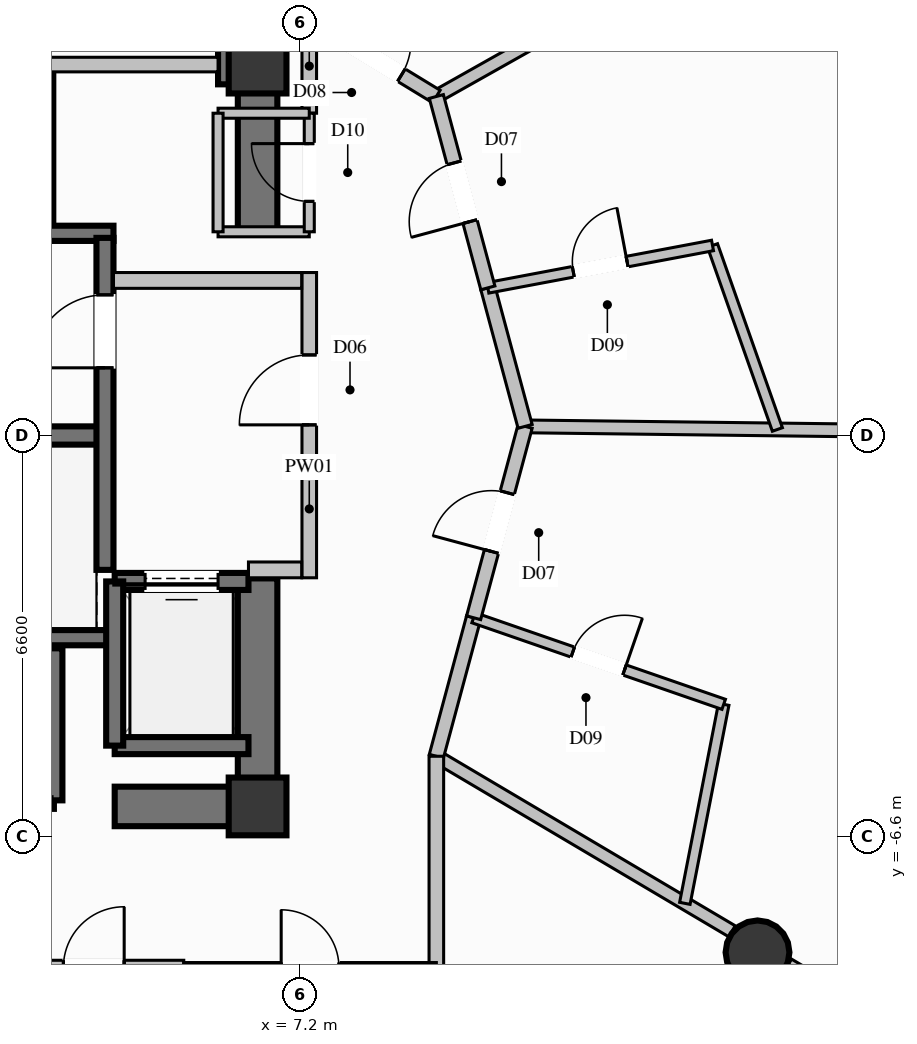
"""IFC4 building model, lengths in metres.
Left out: names, types, materials, properties, quantities, classifications, styles, units other than length and angle.
Written with IfcOpenShell. Run it as: python <this file> out.ifc"""

import sys

from ifc_helpers import new_model, si_unit, direction, frame, frame_2d, origin, origin_2d, place, context, subcontext, project, spatial, rectangle, circle, extrude, element, fill, save


model = new_model("IFC4")
c1 = context("Model", 3, precision=1e-05, world=origin(), true_north=direction((0.0, 1.0)))
c2 = subcontext(c1, "Body", "Model", "MODEL_VIEW")
j1 = project(units=[si_unit("LENGTHUNIT", "METRE"), si_unit("PLANEANGLEUNIT", "RADIAN")], contexts=[c1])
p1 = place(None, origin())
s1 = spatial("IfcSite", under=j1, at=p1, CompositionType="ELEMENT")
p2 = place(p1, origin())
s2 = spatial("IfcBuilding", under=s1, at=p2, CompositionType="ELEMENT")
p3 = place(p2, frame((0.0, 0.0, 135.0)))
s3 = spatial("IfcBuildingStorey", under=s2, at=p3, CompositionType="ELEMENT", Elevation=135.0)
for number, where, z_axis, x_axis in (
    (1, (6.5, -6.1, 0.0), (0.0, 0.0, 1.0), (1.0, 0.0, 0.0)),
    (2, (6.5, 6.1, 0.0), (0.0, 0.0, 1.0), (1.0, 0.0, 0.0)),
):
    element("IfcColumn", number, at=place(p3, frame(where, z_axis=z_axis, x_axis=x_axis)), inside=s3, PredefinedType="COLUMN", context=c2, shape_type="SweptSolid", body=[
        extrude(rectangle(XDim=0.95, YDim=0.95, at=origin_2d()), origin(), (0.0, 0.0, 1.0), 3.6),
    ])
p4 = place(p3, frame((-3.99, 0.0, 0.0), z_axis=(0.0, 0.0, 1.0), x_axis=(1.0, 0.0, 0.0)))
e3 = element("IfcWall", 3, at=p4, inside=s3, PredefinedType="SHEAR", context=c2, shape_type="SweptSolid", body=[
    extrude(rectangle(XDim=7.98, YDim=0.3, at=frame_2d((3.99, 0.0))), origin(), (0.0, 0.0, 1.0), 3.6),
])
for number, where, z_axis, x_axis in (
    (4, (-4.13, -3.325, 0.0), (0.0, 0.0, 1.0), (1.0, 0.0, 0.0)),
    (5, (-4.13, 3.325, 0.0), (0.0, 0.0, 1.0), (1.0, 0.0, 0.0)),
):
    element("IfcWall", number, at=place(p3, frame(where, z_axis=z_axis, x_axis=x_axis)), inside=s3, PredefinedType="SOLIDWALL", context=c2, shape_type="SweptSolid", body=[
        extrude(rectangle(XDim=8.26, YDim=0.25, at=frame_2d((4.13, 0.0))), origin(), (0.0, 0.0, 1.0), 3.6),
    ])
p5 = place(p3, frame((4.15, -6.1, 0.0), z_axis=(0.0, 0.0, 1.0), x_axis=(1.0, 0.0, 0.0)))
e6 = element("IfcWall", 6, at=p5, inside=s3, PredefinedType="SHEAR", context=c2, shape_type="SweptSolid", body=[
    extrude(rectangle(XDim=2.025, YDim=0.65, at=frame_2d((1.013, 0.0))), origin(), (0.0, 0.0, 1.0), 3.6),
])
p6 = place(p3, frame((5.85, 6.1, 0.0), z_axis=(0.0, 0.0, 1.0), x_axis=(1.0, 0.0, 0.0)))
e7 = element("IfcWall", 7, at=p6, inside=s3, PredefinedType="SHEAR", context=c2, shape_type="SweptSolid", body=[
    extrude(rectangle(XDim=0.325, YDim=0.65, at=frame_2d((0.163, 0.0))), origin(), (0.0, 0.0, 1.0), 3.6),
])
p7 = place(p3, frame((6.5, -6.425, 0.0), z_axis=(0.0, 0.0, 1.0), x_axis=(0.0, 1.0, 0.0)))
e8 = element("IfcWall", 8, at=p7, inside=s3, PredefinedType="SHEAR", context=c2, shape_type="SweptSolid", body=[
    extrude(rectangle(XDim=4.075, YDim=0.65, at=frame_2d((2.038, 0.0))), origin(), (0.0, 0.0, 1.0), 3.6),
])
p8 = place(p3, frame((6.5, 3.35, 0.0), z_axis=(0.0, 0.0, 1.0), x_axis=(0.0, 1.0, 0.0)))
e9 = element("IfcWall", 9, at=p8, inside=s3, PredefinedType="SHEAR", context=c2, shape_type="SweptSolid", body=[
    extrude(rectangle(XDim=3.075, YDim=0.65, at=frame_2d((1.538, 0.0))), origin(), (0.0, 0.0, 1.0), 3.6),
])
p9 = place(p3, frame((14.722, -8.5, 0.0), z_axis=(0.0, 0.0, 1.0), x_axis=(1.0, 0.0, 0.0)))
e10 = element("IfcColumn", 10, at=p9, inside=s3, PredefinedType="COLUMN", context=c2, shape_type="SweptSolid", body=[
    extrude(circle(Radius=0.525, at=origin_2d()), origin(), (0.0, 0.0, 1.0), 3.6),
])
p10 = place(p3, frame((1.05, -6.0, 0.0), z_axis=(0.0, 0.0, 1.0), x_axis=(1.0, 0.0, 0.0)))
e11 = element("IfcWall", 11, at=p10, inside=s3, PredefinedType="SOLIDWALL", context=c2, shape_type="SweptSolid", body=[
    extrude(rectangle(XDim=2.1, YDim=0.28, at=frame_2d((1.05, 0.0))), origin(), (0.0, 0.0, 1.0), 3.35),
])
p11 = place(p10, frame((0.5, 0.0, 0.0)))
e12 = element("IfcOpeningElement", 12, at=p11, cuts=e11, PredefinedType="OPENING", context=c2, shape_type="SweptSolid", body=[
    extrude(rectangle(XDim=1.1, YDim=2.2, at=frame_2d((0.55, 1.1))), frame((0.0, 0.15, 0.0), z_axis=(0.0, -1.0, 0.0), x_axis=(1.0, 0.0, 0.0)), (0.0, 0.0, 1.0), 0.3),
])
for number, where, z_axis, x_axis in (
    (13, (3.15, -6.0, 0.0), (0.0, 0.0, 1.0), (0.0, 1.0, 0.0)),
    (14, (3.0, 3.5, 0.0), (0.0, 0.0, 1.0), (0.0, 1.0, 0.0)),
):
    element("IfcWall", number, at=place(p3, frame(where, z_axis=z_axis, x_axis=x_axis)), inside=s3, PredefinedType="SOLIDWALL", context=c2, shape_type="SweptSolid", body=[
        extrude(rectangle(XDim=2.5, YDim=0.28, at=frame_2d((1.25, 0.0))), origin(), (0.0, 0.0, 1.0), 3.35),
    ])
p12 = place(p3, frame((4.15, -5.1, 0.0), z_axis=(0.0, 0.0, 1.0), x_axis=(1.0, 0.0, 0.0)))
e15 = element("IfcWall", 15, at=p12, inside=s3, PredefinedType="SOLIDWALL", context=c2, shape_type="SweptSolid", body=[
    extrude(rectangle(XDim=2.2, YDim=0.28, at=frame_2d((1.1, 0.0))), origin(), (0.0, 0.0, 1.0), 3.35),
])
p13 = place(p3, frame((6.35, -2.4, 0.0), z_axis=(0.0, 0.0, 1.0), x_axis=(-1.0, 0.0, 0.0)))
e16 = element("IfcWall", 16, at=p13, inside=s3, PredefinedType="SOLIDWALL", context=c2, shape_type="SweptSolid", body=[
    extrude(rectangle(XDim=2.2, YDim=0.28, at=frame_2d((1.1, 0.0))), origin(), (0.0, 0.0, 1.0), 3.35),
])
p14 = place(p13, frame((0.5, 0.0, 0.0)))
e17 = element("IfcOpeningElement", 17, at=p14, cuts=e16, PredefinedType="OPENING", context=c2, shape_type="SweptSolid", body=[
    extrude(rectangle(XDim=1.2, YDim=2.2, at=frame_2d((0.6, 1.1))), frame((0.0, 0.15, 0.0), z_axis=(0.0, -1.0, 0.0), x_axis=(1.0, 0.0, 0.0)), (0.0, 0.0, 1.0), 0.3),
])
p15 = place(p3, frame((4.15, -2.4, 0.0), z_axis=(0.0, 0.0, 1.0), x_axis=(0.0, -1.0, 0.0)))
e18 = element("IfcWall", 18, at=p15, inside=s3, PredefinedType="SOLIDWALL", context=c2, shape_type="SweptSolid", body=[
    extrude(rectangle(XDim=2.7, YDim=0.28, at=frame_2d((1.35, 0.0))), origin(), (0.0, 0.0, 1.0), 3.35),
])
p16 = place(p3, frame((3.99, -2.21, 0.0), z_axis=(0.0, 0.0, 1.0), x_axis=(0.0, 1.0, 0.0)))
e19 = element("IfcWall", 19, at=p16, inside=s3, PredefinedType="SOLIDWALL", context=c2, shape_type="SweptSolid", body=[
    extrude(rectangle(XDim=5.46, YDim=0.28, at=frame_2d((2.73, 0.0))), origin(), (0.0, 0.0, 1.0), 3.35),
])
p17 = place(p16, frame((3.323, 0.0, 0.0)))
e20 = element("IfcOpeningElement", 20, at=p17, cuts=e19, PredefinedType="OPENING", context=c2, shape_type="SweptSolid", body=[
    extrude(rectangle(XDim=1.2, YDim=2.2, at=frame_2d((0.6, 1.1))), frame((0.0, 0.15, 0.0), z_axis=(0.0, -1.0, 0.0), x_axis=(1.0, 0.0, 0.0)), (0.0, 0.0, 1.0), 0.3),
])
p18 = place(p3, frame((7.35, -2.34, 0.0), z_axis=(0.0, 0.0, 1.0), x_axis=(0.0, 1.0, 0.0)))
e21 = element("IfcWall", 21, at=p18, inside=s3, PredefinedType="PARTITIONING", context=c2, shape_type="SweptSolid", body=[
    extrude(rectangle(XDim=5.02, YDim=0.24, at=frame_2d((2.51, 0.0))), origin(), (0.0, 0.0, 1.0), 2.435),
])
p19 = place(p18, frame((2.515, 0.0, 0.0)))
e22 = element("IfcOpeningElement", 22, at=p19, cuts=e21, PredefinedType="OPENING", context=c2, shape_type="SweptSolid", body=[
    extrude(rectangle(XDim=1.15, YDim=2.2, at=frame_2d((0.575, 1.1))), frame((0.0, 0.13, 0.0), z_axis=(0.0, -1.0, 0.0), x_axis=(1.0, 0.0, 0.0)), (0.0, 0.0, 1.0), 0.26),
])
p20 = place(p3, frame((6.35, -2.21, 0.0), z_axis=(0.0, 0.0, 1.0), x_axis=(1.0, 0.0, 0.0)))
e23 = element("IfcWall", 23, at=p20, inside=s3, PredefinedType="PARTITIONING", context=c2, shape_type="SweptSolid", body=[
    extrude(rectangle(XDim=0.875, YDim=0.26, at=frame_2d((0.438, 0.0))), origin(), (0.0, 0.0, 1.0), 3.35),
])
p21 = place(p3, frame((4.13, 2.55, 0.0), z_axis=(0.0, 0.0, 1.0), x_axis=(1.0, 0.0, 0.0)))
e24 = element("IfcWall", 24, at=p21, inside=s3, PredefinedType="PARTITIONING", context=c2, shape_type="SweptSolid", body=[
    extrude(rectangle(XDim=3.095, YDim=0.26, at=frame_2d((1.548, 0.0))), origin(), (0.0, 0.0, 1.0), 3.35),
])
p22 = place(p3, frame((7.35, 5.3, 0.0), z_axis=(0.0, 0.0, 1.0), x_axis=(0.0, 1.0, 0.0)))
e25 = element("IfcWall", 25, at=p22, inside=s3, PredefinedType="PARTITIONING", context=c2, shape_type="SweptSolid", body=[
    extrude(rectangle(XDim=1.55, YDim=0.24, at=frame_2d((0.775, 0.0))), origin(), (0.0, 0.0, 1.0), 2.435),
])
p23 = place(p3, frame((3.0, 6.1, 0.0), z_axis=(0.0, 0.0, 1.0), x_axis=(1.0, 0.0, 0.0)))
e26 = element("IfcWall", 26, at=p23, inside=s3, PredefinedType="PARTITIONING", context=c2, shape_type="SweptSolid", body=[
    extrude(rectangle(XDim=2.85, YDim=0.24, at=frame_2d((1.425, 0.0))), origin(), (0.0, 0.0, 1.0), 2.435),
])
p24 = place(p3, frame((5.85, 3.35, 0.0), z_axis=(0.0, 0.0, 1.0), x_axis=(1.0, 0.0, 0.0)))
e27 = element("IfcWall", 27, at=p24, inside=s3, PredefinedType="PARTITIONING", context=c2, shape_type="SweptSolid", body=[
    extrude(rectangle(XDim=1.5, YDim=0.165, at=frame_2d((0.75, 0.0))), origin(), (0.0, 0.0, 1.0), 3.35),
])
p25 = place(p3, frame((7.35, 3.35, 0.0), z_axis=(0.0, 0.0, 1.0), x_axis=(0.0, 1.0, 0.0)))
e28 = element("IfcWall", 28, at=p25, inside=s3, PredefinedType="PARTITIONING", context=c2, shape_type="SweptSolid", body=[
    extrude(rectangle(XDim=1.95, YDim=0.165, at=frame_2d((0.975, 0.0))), origin(), (0.0, 0.0, 1.0), 3.35),
])
p26 = place(p25, frame((0.5, 0.0, 0.0)))
e29 = element("IfcOpeningElement", 29, at=p26, cuts=e28, PredefinedType="OPENING", context=c2, shape_type="SweptSolid", body=[
    extrude(rectangle(XDim=0.95, YDim=2.1, at=frame_2d((0.475, 1.05))), frame((0.0, 0.093, 0.0), z_axis=(0.0, -1.0, 0.0), x_axis=(1.0, 0.0, 0.0)), (0.0, 0.0, 1.0), 0.185),
])
p27 = place(p3, frame((7.35, 5.3, 0.0), z_axis=(0.0, 0.0, 1.0), x_axis=(-1.0, 0.0, 0.0)))
e30 = element("IfcWall", 30, at=p27, inside=s3, PredefinedType="PARTITIONING", context=c2, shape_type="SweptSolid", body=[
    extrude(rectangle(XDim=1.5, YDim=0.165, at=frame_2d((0.75, 0.0))), origin(), (0.0, 0.0, 1.0), 2.435),
])
p28 = place(p3, frame((5.85, 5.3, 0.0), z_axis=(0.0, 0.0, 1.0), x_axis=(0.0, -1.0, 0.0)))
e31 = element("IfcWall", 31, at=p28, inside=s3, PredefinedType="PARTITIONING", context=c2, shape_type="SweptSolid", body=[
    extrude(rectangle(XDim=1.95, YDim=0.165, at=frame_2d((0.975, 0.0))), origin(), (0.0, 0.0, 1.0), 2.435),
])
p29 = place(p3, frame((10.9, 0.15, 0.0), z_axis=(0.0, 0.0, 1.0), x_axis=(0.999925530249, -0.012203850093, 0.0)))
e32 = element("IfcWall", 32, at=p29, inside=s3, PredefinedType="PARTITIONING", context=c2, shape_type="SweptSolid", body=[
    extrude(rectangle(XDim=5.562, YDim=0.21, at=frame_2d((2.781, 0.0))), origin(), (0.0, 0.0, 1.0), 3.35),
])
p30 = place(p3, frame((9.44, 5.575, 0.0), z_axis=(0.0, 0.0, 1.0), x_axis=(0.871243078021, 0.490851809613, 0.0)))
e33 = element("IfcWall", 33, at=p30, inside=s3, PredefinedType="PARTITIONING", context=c2, shape_type="SweptSolid", body=[
    extrude(rectangle(XDim=5.495, YDim=0.21, at=frame_2d((2.747, 0.0))), origin(), (0.0, 0.0, 1.0), 2.717),
])
p31 = place(p3, frame((9.44, -5.275, 0.0), z_axis=(0.0, 0.0, 1.0), x_axis=(0.860527977628, -0.509403179927, 0.0)))
e34 = element("IfcWall", 34, at=p31, inside=s3, PredefinedType="PARTITIONING", context=c2, shape_type="SweptSolid", body=[
    extrude(rectangle(XDim=5.65, YDim=0.21, at=frame_2d((2.825, 0.0))), origin(), (0.0, 0.0, 1.0), 2.717),
])
p32 = place(p3, frame((15.228, -8.701, 0.0), z_axis=(0.0, 0.0, 1.0), x_axis=(0.860535668123, -0.509390188253, 0.0)))
e35 = element("IfcWall", 35, at=p32, inside=s3, PredefinedType="PARTITIONING", context=c2, shape_type="SweptSolid", body=[
    extrude(rectangle(XDim=7.242, YDim=0.21, at=frame_2d((3.621, 0.0))), origin(), (0.0, 0.0, 1.0), 3.35),
])
p33 = place(p3, frame((7.35, 6.85, 0.0), z_axis=(0.0, 0.0, 1.0), x_axis=(0.853641534933, -0.520860950579, 0.0)))
e36 = element("IfcWall", 36, at=p33, inside=s3, PredefinedType="PARTITIONING", context=c2, shape_type="SweptSolid", body=[
    extrude(rectangle(XDim=2.448, YDim=0.24, at=frame_2d((1.224, 0.0))), origin(), (0.0, 0.0, 1.0), 3.35),
])
p34 = place(p33, frame((0.674, 0.0, 0.0)))
e37 = element("IfcOpeningElement", 37, at=p34, cuts=e36, PredefinedType="OPENING", context=c2, shape_type="SweptSolid", body=[
    extrude(rectangle(XDim=1.1, YDim=2.3, at=frame_2d((0.55, 1.15))), frame((0.0, 0.13, 0.0), z_axis=(0.0, -1.0, 0.0), x_axis=(1.0, 0.0, 0.0)), (0.0, 0.0, 1.0), 0.26),
])
p35 = place(p3, frame((9.44, -5.275, 0.0), z_axis=(0.0, 0.0, 1.0), x_axis=(0.25988439237, 0.965639737481, 0.0)))
e38 = element("IfcWall", 38, at=p35, inside=s3, PredefinedType="PARTITIONING", context=c2, shape_type="SweptSolid", body=[
    extrude(rectangle(XDim=2.359, YDim=0.24, at=frame_2d((1.179, 0.0))), origin(), (0.0, 0.0, 1.0), 3.35),
])
p36 = place(p3, frame((13.527, -7.694, 0.0), z_axis=(0.0, 0.0, 1.0), x_axis=(0.191580880293, 0.981476829225, 0.0)))
e39 = element("IfcWall", 39, at=p36, inside=s3, PredefinedType="PLUMBINGWALL", context=c2, shape_type="SweptSolid", body=[
    extrude(rectangle(XDim=3.335, YDim=0.175, at=frame_2d((1.667, 0.0))), origin(), (0.0, 0.0, 1.0), 3.35),
])
p37 = place(p3, frame((10.053, -2.997, 0.0), z_axis=(0.0, 0.0, 1.0), x_axis=(0.944980071375, -0.327127902669, 0.0)))
e40 = element("IfcWall", 40, at=p37, inside=s3, PredefinedType="PLUMBINGWALL", context=c2, shape_type="SweptSolid", body=[
    extrude(rectangle(XDim=4.353, YDim=0.175, at=frame_2d((2.176, 0.0))), origin(), (0.0, 0.0, 1.0), 3.35),
])
p38 = place(p37, frame((1.726, 0.0, 0.0)))
e41 = element("IfcOpeningElement", 41, at=p38, cuts=e40, PredefinedType="OPENING", context=c2, shape_type="SweptSolid", body=[
    extrude(rectangle(XDim=0.9, YDim=2.1, at=frame_2d((0.45, 1.05))), frame((0.0, 0.098, 0.0), z_axis=(0.0, -1.0, 0.0), x_axis=(1.0, 0.0, 0.0)), (0.0, 0.0, 1.0), 0.195),
])
p39 = place(p3, frame((10.053, -2.997, 0.0), z_axis=(0.0, 0.0, 1.0), x_axis=(0.259876755553, 0.965641792759, 0.0)))
e42 = element("IfcWall", 42, at=p39, inside=s3, PredefinedType="PARTITIONING", context=c2, shape_type="SweptSolid", body=[
    extrude(rectangle(XDim=3.259, YDim=0.24, at=frame_2d((1.629, 0.0))), origin(), (0.0, 0.0, 1.0), 3.35),
])
p40 = place(p39, frame((1.129, 0.0, 0.0)))
e43 = element("IfcOpeningElement", 43, at=p40, cuts=e42, PredefinedType="OPENING", context=c2, shape_type="SweptSolid", body=[
    extrude(rectangle(XDim=1.0, YDim=2.2, at=frame_2d((0.5, 1.1))), frame((0.0, 0.13, 0.0), z_axis=(0.0, -1.0, 0.0), x_axis=(1.0, 0.0, 0.0)), (0.0, 0.0, 1.0), 0.26),
])
p41 = place(p3, frame((10.9, 0.15, 0.0), z_axis=(0.0, 0.0, 1.0), x_axis=(-0.259761917731, 0.965672690976, 0.0)))
e44 = element("IfcWall", 44, at=p41, inside=s3, PredefinedType="PARTITIONING", context=c2, shape_type="SweptSolid", body=[
    extrude(rectangle(XDim=2.359, YDim=0.24, at=frame_2d((1.18, 0.0))), origin(), (0.0, 0.0, 1.0), 3.35),
])
p42 = place(p3, frame((15.049, 0.099, 0.0), z_axis=(0.0, 0.0, 1.0), x_axis=(-0.332593240215, 0.943070377312, 0.0)))
e45 = element("IfcWall", 45, at=p42, inside=s3, PredefinedType="PLUMBINGWALL", context=c2, shape_type="SweptSolid", body=[
    extrude(rectangle(XDim=3.208, YDim=0.175, at=frame_2d((1.604, 0.0))), origin(), (0.0, 0.0, 1.0), 3.35),
])
p43 = place(p3, frame((10.287, 2.428, 0.0), z_axis=(0.0, 0.0, 1.0), x_axis=(0.982667233494, 0.185378284104, 0.0)))
e46 = element("IfcWall", 46, at=p43, inside=s3, PredefinedType="PLUMBINGWALL", context=c2, shape_type="SweptSolid", body=[
    extrude(rectangle(XDim=3.76, YDim=0.175, at=frame_2d((1.88, 0.0))), origin(), (0.0, 0.0, 1.0), 3.35),
])
p44 = place(p43, frame((1.43, 0.0, 0.0)))
e47 = element("IfcOpeningElement", 47, at=p44, cuts=e46, PredefinedType="OPENING", context=c2, shape_type="SweptSolid", body=[
    extrude(rectangle(XDim=0.9, YDim=2.1, at=frame_2d((0.45, 1.05))), frame((0.0, 0.098, 0.0), z_axis=(0.0, -1.0, 0.0), x_axis=(1.0, 0.0, 0.0)), (0.0, 0.0, 1.0), 0.195),
])
p45 = place(p3, frame((10.287, 2.428, 0.0), z_axis=(0.0, 0.0, 1.0), x_axis=(-0.259946608151, 0.965622991084, 0.0)))
e48 = element("IfcWall", 48, at=p45, inside=s3, PredefinedType="PARTITIONING", context=c2, shape_type="SweptSolid", body=[
    extrude(rectangle(XDim=3.259, YDim=0.24, at=frame_2d((1.629, 0.0))), origin(), (0.0, 0.0, 1.0), 3.35),
])
p46 = place(p45, frame((1.129, 0.0, 0.0)))
e49 = element("IfcOpeningElement", 49, at=p46, cuts=e48, PredefinedType="OPENING", context=c2, shape_type="SweptSolid", body=[
    extrude(rectangle(XDim=1.0, YDim=2.2, at=frame_2d((0.5, 1.1))), frame((0.0, 0.13, 0.0), z_axis=(0.0, -1.0, 0.0), x_axis=(1.0, 0.0, 0.0)), (0.0, 0.0, 1.0), 0.26),
])
p47 = place(p3, frame((5.286, -8.75, 0.0), z_axis=(0.0, 0.0, 1.0), x_axis=(0.635601055051, -0.772017680379, 0.0)))
e50 = element("IfcWall", 50, at=p47, inside=s3, PredefinedType="PARTITIONING", context=c2, shape_type="SweptSolid", body=[
    extrude(rectangle(XDim=14.344, YDim=0.21, at=frame_2d((7.172, 0.0))), origin(), (0.0, 0.0, 1.0), 3.35),
])
p48 = place(p3, frame((2.326, -8.75, 0.0), z_axis=(0.0, 0.0, 1.0), x_axis=(1.0, 0.0, 0.0)))
e51 = element("IfcWall", 51, at=p48, inside=s3, PredefinedType="PARTITIONING", context=c2, shape_type="SweptSolid", body=[
    extrude(rectangle(XDim=2.96, YDim=0.24, at=frame_2d((1.48, 0.0))), origin(), (0.0, 0.0, 1.0), 3.35),
])
p49 = place(p48, frame((0.98, 0.0, 0.0)))
e52 = element("IfcOpeningElement", 52, at=p49, cuts=e51, PredefinedType="OPENING", context=c2, shape_type="SweptSolid", body=[
    extrude(rectangle(XDim=1.0, YDim=2.2, at=frame_2d((0.5, 1.1))), frame((0.0, 0.13, 0.0), z_axis=(0.0, -1.0, 0.0), x_axis=(1.0, 0.0, 0.0)), (0.0, 0.0, 1.0), 0.26),
])
p50 = place(p3, frame((9.44, -8.75, 0.0), z_axis=(0.0, 0.0, 1.0), x_axis=(0.0, 1.0, 0.0)))
e53 = element("IfcWall", 53, at=p50, inside=s3, PredefinedType="PARTITIONING", context=c2, shape_type="SweptSolid", body=[
    extrude(rectangle(XDim=3.475, YDim=0.24, at=frame_2d((1.738, 0.0))), origin(), (0.0, 0.0, 1.0), 3.35),
])
p51 = place(p3, frame((5.286, -8.75, 0.0), z_axis=(0.0, 0.0, 1.0), x_axis=(1.0, 0.0, 0.0)))
e54 = element("IfcWall", 54, at=p51, inside=s3, PredefinedType="PARTITIONING", context=c2, shape_type="SweptSolid", body=[
    extrude(rectangle(XDim=4.154, YDim=0.165, at=frame_2d((2.077, 0.0))), origin(), (0.0, 0.0, 1.0), 3.35),
])
p52 = place(p51, frame((1.602, 0.0, 0.0)))
e55 = element("IfcOpeningElement", 55, at=p52, cuts=e54, PredefinedType="OPENING", context=c2, shape_type="SweptSolid", body=[
    extrude(rectangle(XDim=0.95, YDim=2.1, at=frame_2d((0.475, 1.05))), frame((0.0, 0.093, 0.0), z_axis=(0.0, -1.0, 0.0), x_axis=(1.0, 0.0, 0.0)), (0.0, 0.0, 1.0), 0.185),
])
p53 = place(p14, origin())
e56 = element("IfcDoor", 56, at=p53, inside=s3, OperationType="SLIDING_TO_LEFT", PredefinedType="DOOR", context=c2, shape_type="SweptSolid", body=[
    extrude(rectangle(XDim=1.2, YDim=2.2, at=frame_2d((0.6, 1.1))), frame((0.0, 0.025, 0.0), z_axis=(0.0, -1.0, 0.0), x_axis=(1.0, 0.0, 0.0)), (0.0, 0.0, 1.0), 0.05),
])
fill(e17, e56)
p54 = place(p17, origin())
e57 = element("IfcDoor", 57, at=p54, inside=s3, OperationType="SINGLE_SWING_LEFT", PredefinedType="DOOR", context=c2, shape_type="SweptSolid", body=[
    extrude(rectangle(XDim=1.2, YDim=2.2, at=frame_2d((0.6, 1.1))), frame((0.0, 0.025, 0.0), z_axis=(0.0, -1.0, 0.0), x_axis=(1.0, 0.0, 0.0)), (0.0, 0.0, 1.0), 0.05),
])
fill(e20, e57)
p55 = place(p19, origin())
e58 = element("IfcDoor", 58, at=p55, inside=s3, OperationType="SINGLE_SWING_LEFT", PredefinedType="DOOR", context=c2, shape_type="SweptSolid", body=[
    extrude(rectangle(XDim=1.15, YDim=2.2, at=frame_2d((0.575, 1.1))), frame((0.0, 0.025, 0.0), z_axis=(0.0, -1.0, 0.0), x_axis=(1.0, 0.0, 0.0)), (0.0, 0.0, 1.0), 0.05),
])
fill(e22, e58)
p56 = place(p26, origin())
e59 = element("IfcDoor", 59, at=p56, inside=s3, OperationType="SINGLE_SWING_RIGHT", PredefinedType="DOOR", context=c2, shape_type="SweptSolid", body=[
    extrude(rectangle(XDim=0.95, YDim=2.1, at=frame_2d((0.475, 1.05))), frame((0.0, 0.025, 0.0), z_axis=(0.0, -1.0, 0.0), x_axis=(1.0, 0.0, 0.0)), (0.0, 0.0, 1.0), 0.05),
])
fill(e29, e59)
p57 = place(p34, origin())
e60 = element("IfcDoor", 60, at=p57, inside=s3, OperationType="SINGLE_SWING_LEFT", PredefinedType="DOOR", context=c2, shape_type="SweptSolid", body=[
    extrude(rectangle(XDim=1.1, YDim=2.3, at=frame_2d((0.55, 1.15))), frame((0.0, 0.025, 0.0), z_axis=(0.0, -1.0, 0.0), x_axis=(1.0, 0.0, 0.0)), (0.0, 0.0, 1.0), 0.05),
])
fill(e37, e60)
p58 = place(p38, origin())
e61 = element("IfcDoor", 61, at=p58, inside=s3, OperationType="SINGLE_SWING_RIGHT", PredefinedType="DOOR", context=c2, shape_type="SweptSolid", body=[
    extrude(rectangle(XDim=0.9, YDim=2.1, at=frame_2d((0.45, 1.05))), frame((0.0, 0.025, 0.0), z_axis=(0.0, -1.0, 0.0), x_axis=(1.0, 0.0, 0.0)), (0.0, 0.0, 1.0), 0.05),
])
fill(e41, e61)
p59 = place(p40, origin())
e62 = element("IfcDoor", 62, at=p59, inside=s3, OperationType="SINGLE_SWING_LEFT", PredefinedType="DOOR", context=c2, shape_type="SweptSolid", body=[
    extrude(rectangle(XDim=1.0, YDim=2.2, at=frame_2d((0.5, 1.1))), frame((0.0, 0.025, 0.0), z_axis=(0.0, -1.0, 0.0), x_axis=(1.0, 0.0, 0.0)), (0.0, 0.0, 1.0), 0.05),
])
fill(e43, e62)
p60 = place(p44, origin())
e63 = element("IfcDoor", 63, at=p60, inside=s3, OperationType="SINGLE_SWING_RIGHT", PredefinedType="DOOR", context=c2, shape_type="SweptSolid", body=[
    extrude(rectangle(XDim=0.9, YDim=2.1, at=frame_2d((0.45, 1.05))), frame((0.0, 0.025, 0.0), z_axis=(0.0, -1.0, 0.0), x_axis=(1.0, 0.0, 0.0)), (0.0, 0.0, 1.0), 0.05),
])
fill(e47, e63)
p61 = place(p46, origin())
e64 = element("IfcDoor", 64, at=p61, inside=s3, OperationType="SINGLE_SWING_LEFT", PredefinedType="DOOR", context=c2, shape_type="SweptSolid", body=[
    extrude(rectangle(XDim=1.0, YDim=2.2, at=frame_2d((0.5, 1.1))), frame((0.0, 0.025, 0.0), z_axis=(0.0, -1.0, 0.0), x_axis=(1.0, 0.0, 0.0)), (0.0, 0.0, 1.0), 0.05),
])
fill(e49, e64)
save(model, sys.argv[1])
